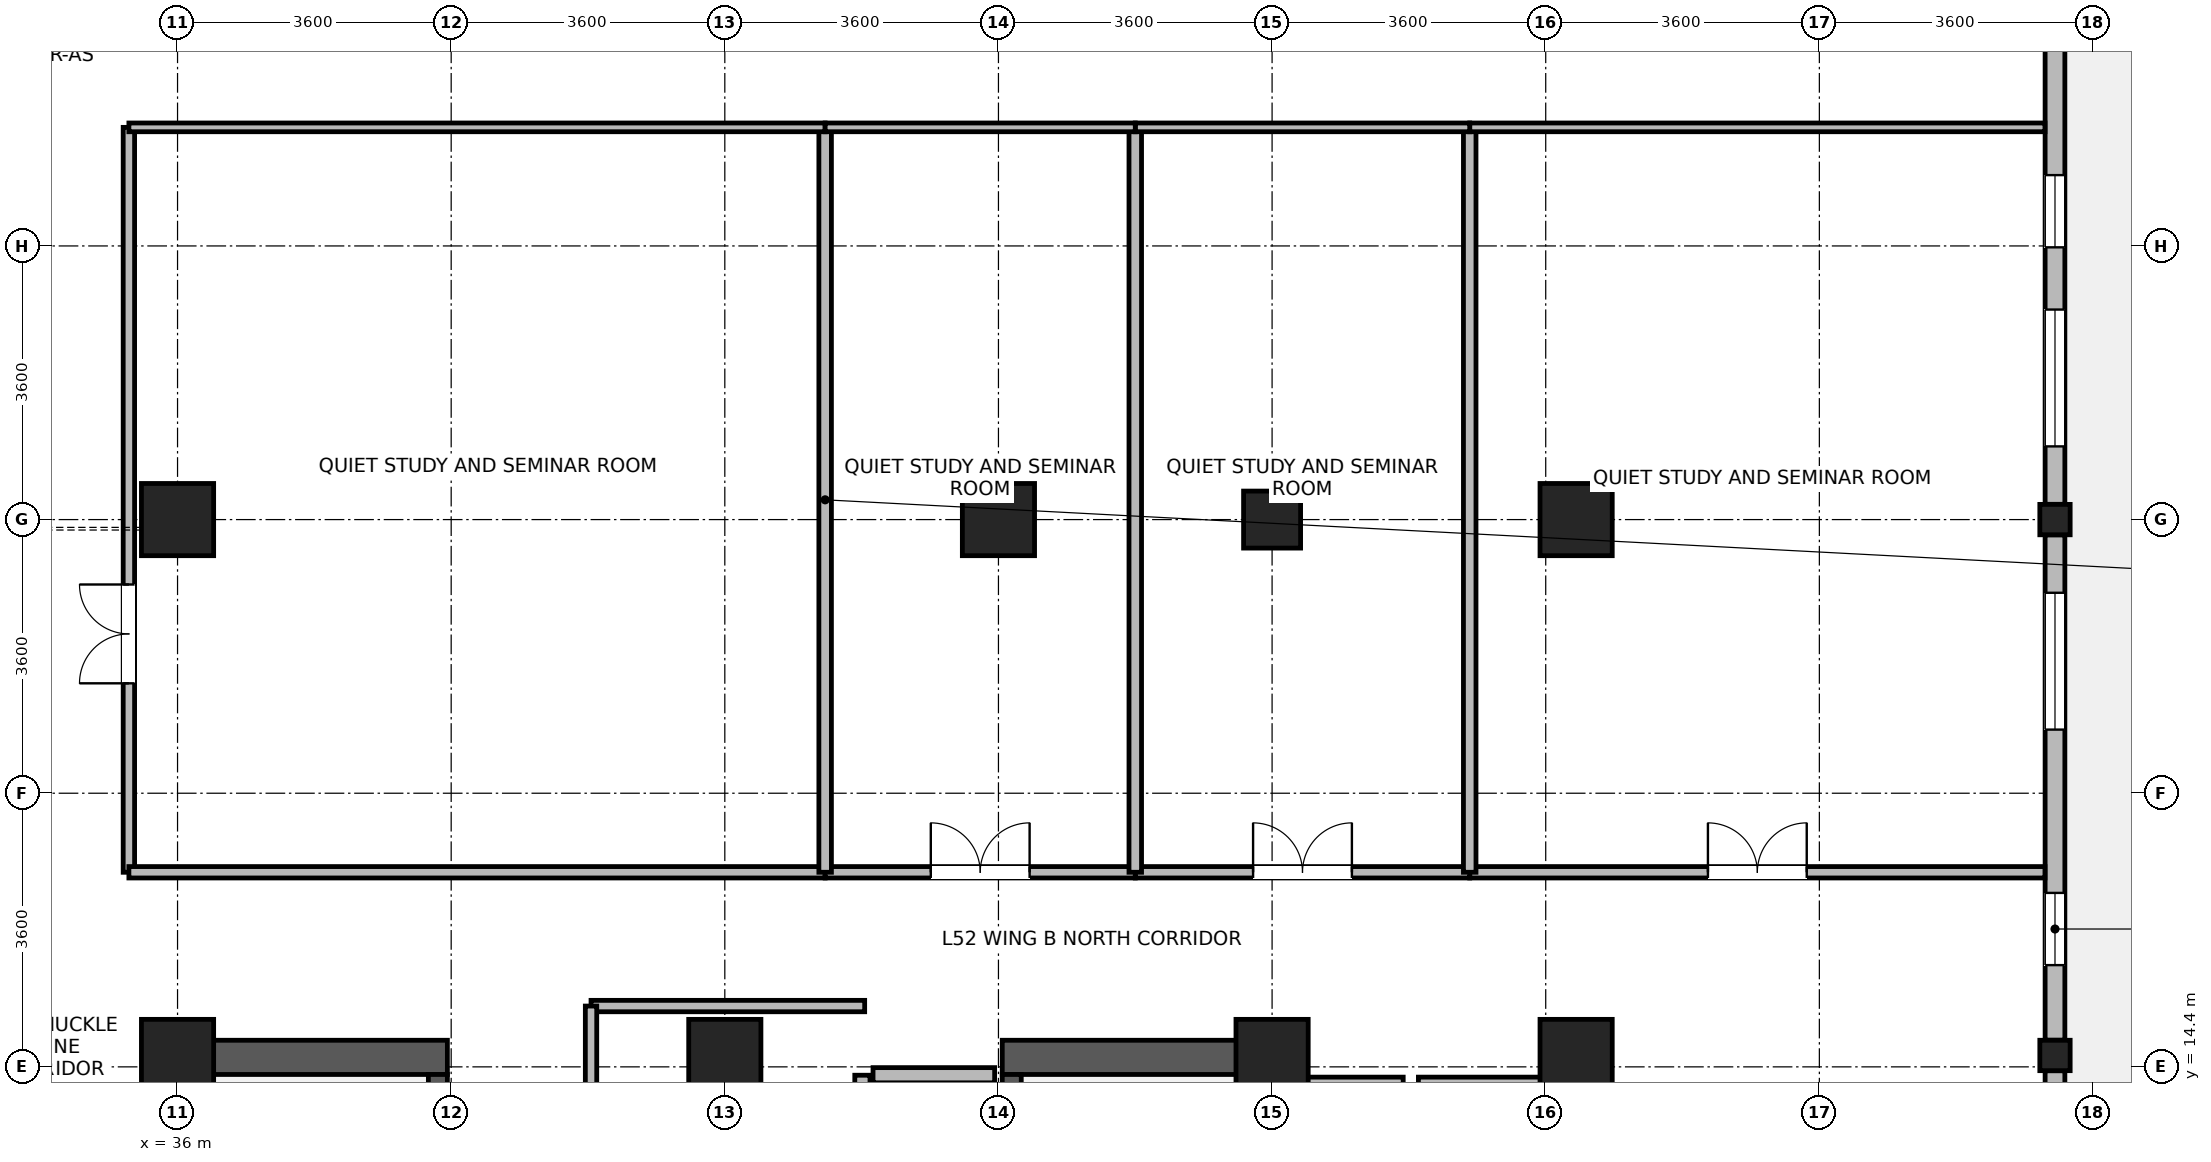
"""IFC4 building model, lengths in metres.
Left out: names, types, materials, properties, quantities, classifications, styles, units other than length and angle.
Written with IfcOpenShell. Run it as: python <this file> out.ifc"""

import sys

from ifc_helpers import new_model, si_unit, direction, frame, frame_2d, origin, origin_2d, place, context, subcontext, project, spatial, rectangle, i_section, extrude, source, transform, mapped, element, fill, save


model = new_model("IFC4")
c1 = context("Model", 3, precision=1e-05, world=origin(), true_north=direction((0.0, 1.0)))
c2 = subcontext(c1, "Body", "Model", "MODEL_VIEW")
j1 = project(units=[si_unit("LENGTHUNIT", "METRE"), si_unit("PLANEANGLEUNIT", "RADIAN")], contexts=[c1])
p1 = place(None, origin())
s1 = spatial("IfcSite", under=j1, at=p1, CompositionType="ELEMENT")
p2 = place(p1, origin())
s2 = spatial("IfcBuilding", under=s1, at=p2, CompositionType="ELEMENT")
p3 = place(p2, frame((0.0, 0.0, 205.5)))
s3 = spatial("IfcBuildingStorey", under=s2, at=p3, CompositionType="ELEMENT", Elevation=205.5)
for number, where, z_axis, x_axis in (
    (1, (36.125, 6.85, 0.0), (0.0, 0.0, 1.0), (0.0, 1.0, 0.0)),
    (2, (50.275, 6.85, 0.0), (0.0, 0.0, 1.0), (0.0, 1.0, 0.0)),
):
    element("IfcWall", number, at=place(p3, frame(where, z_axis=z_axis, x_axis=x_axis)), inside=s3, PredefinedType="SHEAR", context=c2, shape_type="SweptSolid", body=[
        extrude(rectangle(XDim=7.9, YDim=0.45, at=frame_2d((3.95, 0.0))), origin(), (0.0, 0.0, 1.0), 3.47),
    ])
for number, where, z_axis, x_axis in (
    (3, (36.35, 14.525, 0.0), (0.0, 0.0, 1.0), (1.0, 0.0, 0.0)),
    (4, (46.85, 14.525, 0.0), (0.0, 0.0, 1.0), (1.0, 0.0, 0.0)),
):
    element("IfcWall", number, at=place(p3, frame(where, z_axis=z_axis, x_axis=x_axis)), inside=s3, PredefinedType="SHEAR", context=c2, shape_type="SweptSolid", body=[
        extrude(rectangle(XDim=3.2, YDim=0.45, at=frame_2d((1.6, 0.0))), origin(), (0.0, 0.0, 1.0), 3.47),
    ])
p4 = place(p3, frame((39.425, 7.3, 0.0), z_axis=(0.0, 0.0, 1.0), x_axis=(0.0, 1.0, 0.0)))
e5 = element("IfcWall", 5, at=p4, inside=s3, PredefinedType="SHEAR", context=c2, shape_type="SweptSolid", body=[
    extrude(rectangle(XDim=7.0, YDim=0.25, at=frame_2d((3.5, 0.0))), origin(), (0.0, 0.0, 1.0), 3.47),
])
p5 = place(p4, frame((0.15, 0.0, 0.0)))
e6 = element("IfcOpeningElement", 6, at=p5, cuts=e5, PredefinedType="OPENING", context=c2, shape_type="SweptSolid", body=[
    extrude(rectangle(XDim=1.1, YDim=2.08, at=frame_2d((0.55, 1.04))), frame((0.0, 0.135, 0.0), z_axis=(0.0, -1.0, 0.0), x_axis=(1.0, 0.0, 0.0)), (0.0, 0.0, 1.0), 0.27),
])
p6 = place(p3, frame((46.975, 7.3, 0.0), z_axis=(0.0, 0.0, 1.0), x_axis=(0.0, 1.0, 0.0)))
e7 = element("IfcWall", 7, at=p6, inside=s3, PredefinedType="SHEAR", context=c2, shape_type="SweptSolid", body=[
    extrude(rectangle(XDim=7.0, YDim=0.25, at=frame_2d((3.5, 0.0))), origin(), (0.0, 0.0, 1.0), 3.47),
])
p7 = place(p6, frame((0.15, 0.0, 0.0)))
e8 = element("IfcOpeningElement", 8, at=p7, cuts=e7, PredefinedType="OPENING", context=c2, shape_type="SweptSolid", body=[
    extrude(rectangle(XDim=1.1, YDim=2.08, at=frame_2d((0.55, 1.04))), frame((0.0, 0.135, 0.0), z_axis=(0.0, -1.0, 0.0), x_axis=(1.0, 0.0, 0.0)), (0.0, 0.0, 1.0), 0.27),
])
m1 = source(origin(), c2, "Body", "SweptSolid", [
    extrude(rectangle(XDim=0.95, YDim=0.95, at=origin_2d()), origin(), (0.0, 0.0, 1.0), 3.7),
])
for number, where, z_axis, x_axis in (
    (9, (36.0, 21.6, 0.0), (0.0, 0.0, 1.0), (1.0, 0.0, 0.0)),
    (10, (46.8, 21.6, 0.0), (0.0, 0.0, 1.0), (1.0, 0.0, 0.0)),
    (11, (36.0, 14.55, 0.0), (0.0, 0.0, 1.0), (1.0, 0.0, 0.0)),
    (12, (43.2, 14.55, 0.0), (0.0, 0.0, 1.0), (1.0, 0.0, 0.0)),
    (13, (50.4, 14.55, 0.0), (0.0, 0.0, 1.0), (1.0, 0.0, 0.0)),
):
    element("IfcColumn", number, at=place(p3, frame(where, z_axis=z_axis, x_axis=x_axis)), inside=s3, PredefinedType="COLUMN", context=c2, shape_type="MappedRepresentation", body=[
        mapped(m1, transform((0.0, 0.0, 0.0), x_axis=(1.0, 0.0, 0.0), y_axis=(0.0, 1.0, 0.0), z_axis=(0.0, 0.0, 1.0), scale=1.0)),
    ])
m2 = source(origin(), c2, "Body", "SweptSolid", [
    extrude(rectangle(XDim=0.75, YDim=0.75, at=origin_2d()), origin(), (0.0, 0.0, 1.0), 3.7),
])
p8 = place(p3, frame((50.4, 21.6, 0.0), z_axis=(0.0, 0.0, 1.0), x_axis=(1.0, 0.0, 0.0)))
e14 = element("IfcColumn", 14, at=p8, inside=s3, PredefinedType="PILASTER", context=c2, shape_type="MappedRepresentation", body=[
    mapped(m2, transform((0.0, 0.0, 0.0), x_axis=(1.0, 0.0, 0.0), y_axis=(0.0, 1.0, 0.0), z_axis=(0.0, 0.0, 1.0), scale=1.0)),
])
for number, where, z_axis, x_axis in (
    (15, (54.4, 14.55, 0.0), (0.0, 0.0, 1.0), (1.0, 0.0, 0.0)),
    (16, (54.4, 21.6, 0.0), (0.0, 0.0, 1.0), (1.0, 0.0, 0.0)),
):
    element("IfcColumn", number, at=place(p3, frame(where, z_axis=z_axis, x_axis=x_axis)), inside=s3, PredefinedType="COLUMN", context=c2, shape_type="MappedRepresentation", body=[
        mapped(m1, transform((0.0, 0.0, 0.0), x_axis=(1.0, 0.0, 0.0), y_axis=(0.0, 1.0, 0.0), z_axis=(0.0, 0.0, 1.0), scale=1.0)),
    ])
m3 = source(origin(), c2, "Body", "SweptSolid", [
    extrude(i_section(OverallWidth=0.399, OverallDepth=0.4, WebThickness=0.017, FlangeThickness=0.023, FilletRadius=0.015, at=origin_2d()), origin(), (0.0, 0.0, 1.0), 3.7),
])
for number, where, z_axis, x_axis in (
    (17, (60.7, 14.55, 0.0), (0.0, 0.0, 1.0), (1.0, 0.0, 0.0)),
    (18, (60.7, 21.6, 0.0), (0.0, 0.0, 1.0), (1.0, 0.0, 0.0)),
):
    element("IfcColumn", number, at=place(p3, frame(where, z_axis=z_axis, x_axis=x_axis)), inside=s3, PredefinedType="COLUMN", context=c2, shape_type="MappedRepresentation", body=[
        mapped(m3, transform((0.0, 0.0, 0.0), x_axis=(1.0, 0.0, 0.0), y_axis=(0.0, 1.0, 0.0), z_axis=(0.0, 0.0, 1.0), scale=1.0)),
    ])
p9 = place(p3, frame((60.7, 14.349, 0.0), z_axis=(0.0, 0.0, 1.0), x_axis=(0.0, -1.0, 0.0)))
e19 = element("IfcWall", 19, at=p9, inside=s3, PredefinedType="STANDARD", context=c2, shape_type="SweptSolid", body=[
    extrude(rectangle(XDim=7.098, YDim=0.26, at=frame_2d((3.549, 0.0))), origin(), (0.0, 0.0, 1.0), 3.0),
])
p10 = place(p9, frame((2.799, 0.0, 0.0)))
e20 = element("IfcOpeningElement", 20, at=p10, cuts=e19, PredefinedType="OPENING", context=c2, shape_type="SweptSolid", body=[
    extrude(rectangle(XDim=1.5, YDim=2.15, at=frame_2d((0.75, 1.075))), frame((0.0, 0.14, 0.0), z_axis=(0.0, -1.0, 0.0), x_axis=(1.0, 0.0, 0.0)), (0.0, 0.0, 1.0), 0.28),
])
p11 = place(p3, frame((60.7, 21.399, 0.0), z_axis=(0.0, 0.0, 1.0), x_axis=(0.0, -1.0, 0.0)))
e21 = element("IfcWall", 21, at=p11, inside=s3, PredefinedType="STANDARD", context=c2, shape_type="SweptSolid", body=[
    extrude(rectangle(XDim=6.648, YDim=0.26, at=frame_2d((3.324, 0.0))), origin(), (0.0, 0.0, 1.0), 3.0),
])
p12 = place(p11, frame((0.762, 0.0, 0.85)))
e22 = element("IfcOpeningElement", 22, at=p12, cuts=e21, PredefinedType="OPENING", context=c2, shape_type="SweptSolid", body=[
    extrude(rectangle(XDim=1.8, YDim=1.85, at=frame_2d((0.9, 0.925))), frame((0.0, 0.14, 0.0), z_axis=(0.0, -1.0, 0.0), x_axis=(1.0, 0.0, 0.0)), (0.0, 0.0, 1.0), 0.28),
])
p13 = place(p11, frame((4.71, 0.0, 0.85)))
e23 = element("IfcOpeningElement", 23, at=p13, cuts=e21, PredefinedType="OPENING", context=c2, shape_type="SweptSolid", body=[
    extrude(rectangle(XDim=0.95, YDim=1.75, at=frame_2d((0.475, 0.875))), frame((0.0, 0.14, 0.0), z_axis=(0.0, -1.0, 0.0), x_axis=(1.0, 0.0, 0.0)), (0.0, 0.0, 1.0), 0.28),
])
p14 = place(p3, frame((60.7, 28.449, 0.0), z_axis=(0.0, 0.0, 1.0), x_axis=(0.0, -1.0, 0.0)))
e24 = element("IfcWall", 24, at=p14, inside=s3, PredefinedType="STANDARD", context=c2, shape_type="SweptSolid", body=[
    extrude(rectangle(XDim=6.648, YDim=0.26, at=frame_2d((3.324, 0.0))), origin(), (0.0, 0.0, 1.0), 3.0),
])
p15 = place(p14, frame((4.086, 0.0, 0.85)))
e25 = element("IfcOpeningElement", 25, at=p15, cuts=e24, PredefinedType="OPENING", context=c2, shape_type="SweptSolid", body=[
    extrude(rectangle(XDim=1.8, YDim=1.85, at=frame_2d((0.9, 0.925))), frame((0.0, 0.14, 0.0), z_axis=(0.0, -1.0, 0.0), x_axis=(1.0, 0.0, 0.0)), (0.0, 0.0, 1.0), 0.28),
])
p16 = place(p14, frame((2.317, 0.0, 0.85)))
e26 = element("IfcOpeningElement", 26, at=p16, cuts=e24, PredefinedType="OPENING", context=c2, shape_type="SweptSolid", body=[
    extrude(rectangle(XDim=0.95, YDim=1.75, at=frame_2d((0.475, 0.875))), frame((0.0, 0.14, 0.0), z_axis=(0.0, -1.0, 0.0), x_axis=(1.0, 0.0, 0.0)), (0.0, 0.0, 1.0), 0.28),
])
p17 = place(p3, frame((50.475, 14.165, 0.0), z_axis=(0.0, 0.0, 1.0), x_axis=(1.0, 0.0, 0.0)))
e27 = element("IfcWall", 27, at=p17, inside=s3, PredefinedType="PARTITIONING", context=c2, shape_type="SweptSolid", body=[
    extrude(rectangle(XDim=1.65, YDim=0.2, at=frame_2d((0.825, 0.0))), origin(), (0.0, 0.0, 1.0), 3.45),
])
p18 = place(p3, frame((52.325, 14.165, 0.0), z_axis=(0.0, 0.0, 1.0), x_axis=(1.0, 0.0, 0.0)))
e28 = element("IfcWall", 28, at=p18, inside=s3, PredefinedType="PARTITIONING", context=c2, shape_type="SweptSolid", body=[
    extrude(rectangle(XDim=1.65, YDim=0.2, at=frame_2d((0.825, 0.0))), origin(), (0.0, 0.0, 1.0), 3.45),
])
p19 = place(p3, frame((45.15, 14.29, 0.0), z_axis=(0.0, 0.0, 1.0), x_axis=(1.0, 0.0, 0.0)))
e29 = element("IfcWall", 29, at=p19, inside=s3, PredefinedType="PARTITIONING", context=c2, shape_type="SweptSolid", body=[
    extrude(rectangle(XDim=1.6, YDim=0.2, at=frame_2d((0.8, 0.0))), origin(), (0.0, 0.0, 1.0), 2.45),
])
p20 = place(p3, frame((45.01, 11.61, 0.0), z_axis=(0.0, 0.0, 1.0), x_axis=(0.0, 1.0, 0.0)))
e30 = element("IfcWall", 30, at=p20, inside=s3, PredefinedType="PARTITIONING", context=c2, shape_type="SweptSolid", body=[
    extrude(rectangle(XDim=2.68, YDim=0.2, at=frame_2d((1.34, 0.0))), origin(), (0.0, 0.0, 1.0), 3.45),
])
p21 = place(p3, frame((35.36, 16.96, 0.0), z_axis=(0.0, 0.0, 1.0), x_axis=(0.0, 1.0, 0.0)))
e31 = element("IfcWall", 31, at=p21, inside=s3, PredefinedType="PARTITIONING", context=c2, shape_type="SweptSolid", body=[
    extrude(rectangle(XDim=9.8, YDim=0.15, at=frame_2d((4.9, 0.0))), origin(), (0.0, 0.0, 1.0), 3.45),
])
p22 = place(p21, frame((2.486, 0.0, 0.0)))
e32 = element("IfcOpeningElement", 32, at=p22, cuts=e31, PredefinedType="OPENING", context=c2, shape_type="SweptSolid", body=[
    extrude(rectangle(XDim=1.3, YDim=2.12, at=frame_2d((0.65, 1.06))), frame((0.0, 0.085, 0.0), z_axis=(0.0, -1.0, 0.0), x_axis=(1.0, 0.0, 0.0)), (0.0, 0.0, 1.0), 0.17),
])
p23 = place(p3, frame((35.36, 16.96, 0.0), z_axis=(0.0, 0.0, 1.0), x_axis=(1.0, 0.0, 0.0)))
e33 = element("IfcWall", 33, at=p23, inside=s3, PredefinedType="PARTITIONING", context=c2, shape_type="SweptSolid", body=[
    extrude(rectangle(XDim=9.16, YDim=0.15, at=frame_2d((4.58, 0.0))), origin(), (0.0, 0.0, 1.0), 3.45),
])
p24 = place(p3, frame((53.0, 16.96, 0.0), z_axis=(0.0, 0.0, 1.0), x_axis=(1.0, 0.0, 0.0)))
e34 = element("IfcWall", 34, at=p24, inside=s3, PredefinedType="PARTITIONING", context=c2, shape_type="SweptSolid", body=[
    extrude(rectangle(XDim=7.568, YDim=0.15, at=frame_2d((3.784, 0.0))), origin(), (0.0, 0.0, 1.0), 3.45),
])
p25 = place(p24, frame((3.134, 0.0, 0.0)))
e35 = element("IfcOpeningElement", 35, at=p25, cuts=e34, PredefinedType="OPENING", context=c2, shape_type="SweptSolid", body=[
    extrude(rectangle(XDim=1.3, YDim=2.12, at=frame_2d((0.65, 1.06))), frame((0.0, 0.085, 0.0), z_axis=(0.0, -1.0, 0.0), x_axis=(1.0, 0.0, 0.0)), (0.0, 0.0, 1.0), 0.17),
])
p26 = place(p3, frame((48.6, 16.96, 0.0), z_axis=(0.0, 0.0, 1.0), x_axis=(1.0, 0.0, 0.0)))
e36 = element("IfcWall", 36, at=p26, inside=s3, PredefinedType="PARTITIONING", context=c2, shape_type="SweptSolid", body=[
    extrude(rectangle(XDim=4.4, YDim=0.15, at=frame_2d((2.2, 0.0))), origin(), (0.0, 0.0, 1.0), 3.45),
])
p27 = place(p26, frame((1.55, 0.0, 0.0)))
e37 = element("IfcOpeningElement", 37, at=p27, cuts=e36, PredefinedType="OPENING", context=c2, shape_type="SweptSolid", body=[
    extrude(rectangle(XDim=1.3, YDim=2.12, at=frame_2d((0.65, 1.06))), frame((0.0, 0.085, 0.0), z_axis=(0.0, -1.0, 0.0), x_axis=(1.0, 0.0, 0.0)), (0.0, 0.0, 1.0), 0.17),
])
p28 = place(p3, frame((44.52, 16.96, 0.0), z_axis=(0.0, 0.0, 1.0), x_axis=(1.0, 0.0, 0.0)))
e38 = element("IfcWall", 38, at=p28, inside=s3, PredefinedType="PARTITIONING", context=c2, shape_type="SweptSolid", body=[
    extrude(rectangle(XDim=4.08, YDim=0.15, at=frame_2d((2.04, 0.0))), origin(), (0.0, 0.0, 1.0), 3.45),
])
p29 = place(p28, frame((1.39, 0.0, 0.0)))
e39 = element("IfcOpeningElement", 39, at=p29, cuts=e38, PredefinedType="OPENING", context=c2, shape_type="SweptSolid", body=[
    extrude(rectangle(XDim=1.3, YDim=2.12, at=frame_2d((0.65, 1.06))), frame((0.0, 0.085, 0.0), z_axis=(0.0, -1.0, 0.0), x_axis=(1.0, 0.0, 0.0)), (0.0, 0.0, 1.0), 0.17),
])
p30 = place(p3, frame((41.44, 15.2, 0.0), z_axis=(0.0, 0.0, 1.0), x_axis=(1.0, 0.0, 0.0)))
e40 = element("IfcWall", 40, at=p30, inside=s3, PredefinedType="PARTITIONING", context=c2, shape_type="SweptSolid", body=[
    extrude(rectangle(XDim=3.6, YDim=0.15, at=frame_2d((1.8, 0.0))), origin(), (0.0, 0.0, 1.0), 3.45),
])
p31 = place(p3, frame((41.44, 11.64, 0.0), z_axis=(0.0, 0.0, 1.0), x_axis=(0.0, 1.0, 0.0)))
e41 = element("IfcWall", 41, at=p31, inside=s3, PredefinedType="PARTITIONING", context=c2, shape_type="SweptSolid", body=[
    extrude(rectangle(XDim=3.56, YDim=0.15, at=frame_2d((1.78, 0.0))), origin(), (0.0, 0.0, 1.0), 3.45),
])
for number, where, z_axis, x_axis in (
    (42, (44.52, 16.96, 0.0), (0.0, 0.0, 1.0), (0.0, 1.0, 0.0)),
    (43, (48.6, 16.96, 0.0), (0.0, 0.0, 1.0), (0.0, 1.0, 0.0)),
    (44, (53.0, 16.96, 0.0), (0.0, 0.0, 1.0), (0.0, 1.0, 0.0)),
):
    element("IfcWall", number, at=place(p3, frame(where, z_axis=z_axis, x_axis=x_axis)), inside=s3, PredefinedType="PARTITIONING", context=c2, shape_type="SweptSolid", body=[
        extrude(rectangle(XDim=9.8, YDim=0.165, at=frame_2d((4.9, 0.0))), origin(), (0.0, 0.0, 1.0), 3.45),
    ])
p32 = place(p3, frame((35.36, 26.76, 0.0), z_axis=(0.0, 0.0, 1.0), x_axis=(1.0, 0.0, 0.0)))
e45 = element("IfcWall", 45, at=p32, inside=s3, PredefinedType="PARTITIONING", context=c2, shape_type="SweptSolid", body=[
    extrude(rectangle(XDim=9.16, YDim=0.115, at=frame_2d((4.58, 0.0))), origin(), (0.0, 0.0, 1.0), 3.45),
])
p33 = place(p3, frame((53.0, 26.76, 0.0), z_axis=(0.0, 0.0, 1.0), x_axis=(1.0, 0.0, 0.0)))
e46 = element("IfcWall", 46, at=p33, inside=s3, PredefinedType="PARTITIONING", context=c2, shape_type="SweptSolid", body=[
    extrude(rectangle(XDim=7.568, YDim=0.115, at=frame_2d((3.784, 0.0))), origin(), (0.0, 0.0, 1.0), 3.45),
])
p34 = place(p3, frame((48.6, 26.76, 0.0), z_axis=(0.0, 0.0, 1.0), x_axis=(1.0, 0.0, 0.0)))
e47 = element("IfcWall", 47, at=p34, inside=s3, PredefinedType="PARTITIONING", context=c2, shape_type="SweptSolid", body=[
    extrude(rectangle(XDim=4.4, YDim=0.115, at=frame_2d((2.2, 0.0))), origin(), (0.0, 0.0, 1.0), 3.45),
])
p35 = place(p3, frame((44.52, 26.76, 0.0), z_axis=(0.0, 0.0, 1.0), x_axis=(1.0, 0.0, 0.0)))
e48 = element("IfcWall", 48, at=p35, inside=s3, PredefinedType="PARTITIONING", context=c2, shape_type="SweptSolid", body=[
    extrude(rectangle(XDim=4.08, YDim=0.115, at=frame_2d((2.04, 0.0))), origin(), (0.0, 0.0, 1.0), 3.45),
])
p36 = place(p12, origin())
e49 = element("IfcWindow", 49, at=p36, inside=s3, PartitioningType="SINGLE_PANEL", PredefinedType="WINDOW", context=c2, shape_type="SweptSolid", body=[
    extrude(rectangle(XDim=1.8, YDim=1.85, at=frame_2d((0.9, 0.925))), frame((0.0, 0.03, 0.0), z_axis=(0.0, -1.0, 0.0), x_axis=(1.0, 0.0, 0.0)), (0.0, 0.0, 1.0), 0.06),
])
fill(e22, e49)
p37 = place(p13, origin())
e50 = element("IfcWindow", 50, at=p37, inside=s3, PartitioningType="SINGLE_PANEL", PredefinedType="WINDOW", context=c2, shape_type="SweptSolid", body=[
    extrude(rectangle(XDim=0.95, YDim=1.75, at=frame_2d((0.475, 0.875))), frame((0.0, 0.03, 0.0), z_axis=(0.0, -1.0, 0.0), x_axis=(1.0, 0.0, 0.0)), (0.0, 0.0, 1.0), 0.06),
])
fill(e23, e50)
p38 = place(p15, origin())
e51 = element("IfcWindow", 51, at=p38, inside=s3, PartitioningType="SINGLE_PANEL", PredefinedType="WINDOW", context=c2, shape_type="SweptSolid", body=[
    extrude(rectangle(XDim=1.8, YDim=1.85, at=frame_2d((0.9, 0.925))), frame((0.0, 0.03, 0.0), z_axis=(0.0, -1.0, 0.0), x_axis=(1.0, 0.0, 0.0)), (0.0, 0.0, 1.0), 0.06),
])
fill(e25, e51)
p39 = place(p16, origin())
e52 = element("IfcWindow", 52, at=p39, inside=s3, PartitioningType="SINGLE_PANEL", PredefinedType="WINDOW", context=c2, shape_type="SweptSolid", body=[
    extrude(rectangle(XDim=0.95, YDim=1.75, at=frame_2d((0.475, 0.875))), frame((0.0, 0.03, 0.0), z_axis=(0.0, -1.0, 0.0), x_axis=(1.0, 0.0, 0.0)), (0.0, 0.0, 1.0), 0.06),
])
fill(e26, e52)
p40 = place(p22, origin())
e53 = element("IfcDoor", 53, at=p40, inside=s3, OperationType="DOUBLE_DOOR_SINGLE_SWING", PredefinedType="DOOR", context=c2, shape_type="SweptSolid", body=[
    extrude(rectangle(XDim=1.3, YDim=2.12, at=frame_2d((0.65, 1.06))), frame((0.0, 0.025, 0.0), z_axis=(0.0, -1.0, 0.0), x_axis=(1.0, 0.0, 0.0)), (0.0, 0.0, 1.0), 0.05),
])
fill(e32, e53)
p41 = place(p25, origin())
e54 = element("IfcDoor", 54, at=p41, inside=s3, OperationType="DOUBLE_DOOR_SINGLE_SWING", PredefinedType="DOOR", context=c2, shape_type="SweptSolid", body=[
    extrude(rectangle(XDim=1.3, YDim=2.12, at=frame_2d((0.65, 1.06))), frame((0.0, 0.025, 0.0), z_axis=(0.0, -1.0, 0.0), x_axis=(1.0, 0.0, 0.0)), (0.0, 0.0, 1.0), 0.05),
])
fill(e35, e54)
p42 = place(p27, origin())
e55 = element("IfcDoor", 55, at=p42, inside=s3, OperationType="DOUBLE_DOOR_SINGLE_SWING", PredefinedType="DOOR", context=c2, shape_type="SweptSolid", body=[
    extrude(rectangle(XDim=1.3, YDim=2.12, at=frame_2d((0.65, 1.06))), frame((0.0, 0.025, 0.0), z_axis=(0.0, -1.0, 0.0), x_axis=(1.0, 0.0, 0.0)), (0.0, 0.0, 1.0), 0.05),
])
fill(e37, e55)
p43 = place(p29, origin())
e56 = element("IfcDoor", 56, at=p43, inside=s3, OperationType="DOUBLE_DOOR_SINGLE_SWING", PredefinedType="DOOR", context=c2, shape_type="SweptSolid", body=[
    extrude(rectangle(XDim=1.3, YDim=2.12, at=frame_2d((0.65, 1.06))), frame((0.0, 0.025, 0.0), z_axis=(0.0, -1.0, 0.0), x_axis=(1.0, 0.0, 0.0)), (0.0, 0.0, 1.0), 0.05),
])
fill(e39, e56)
save(model, sys.argv[1])
